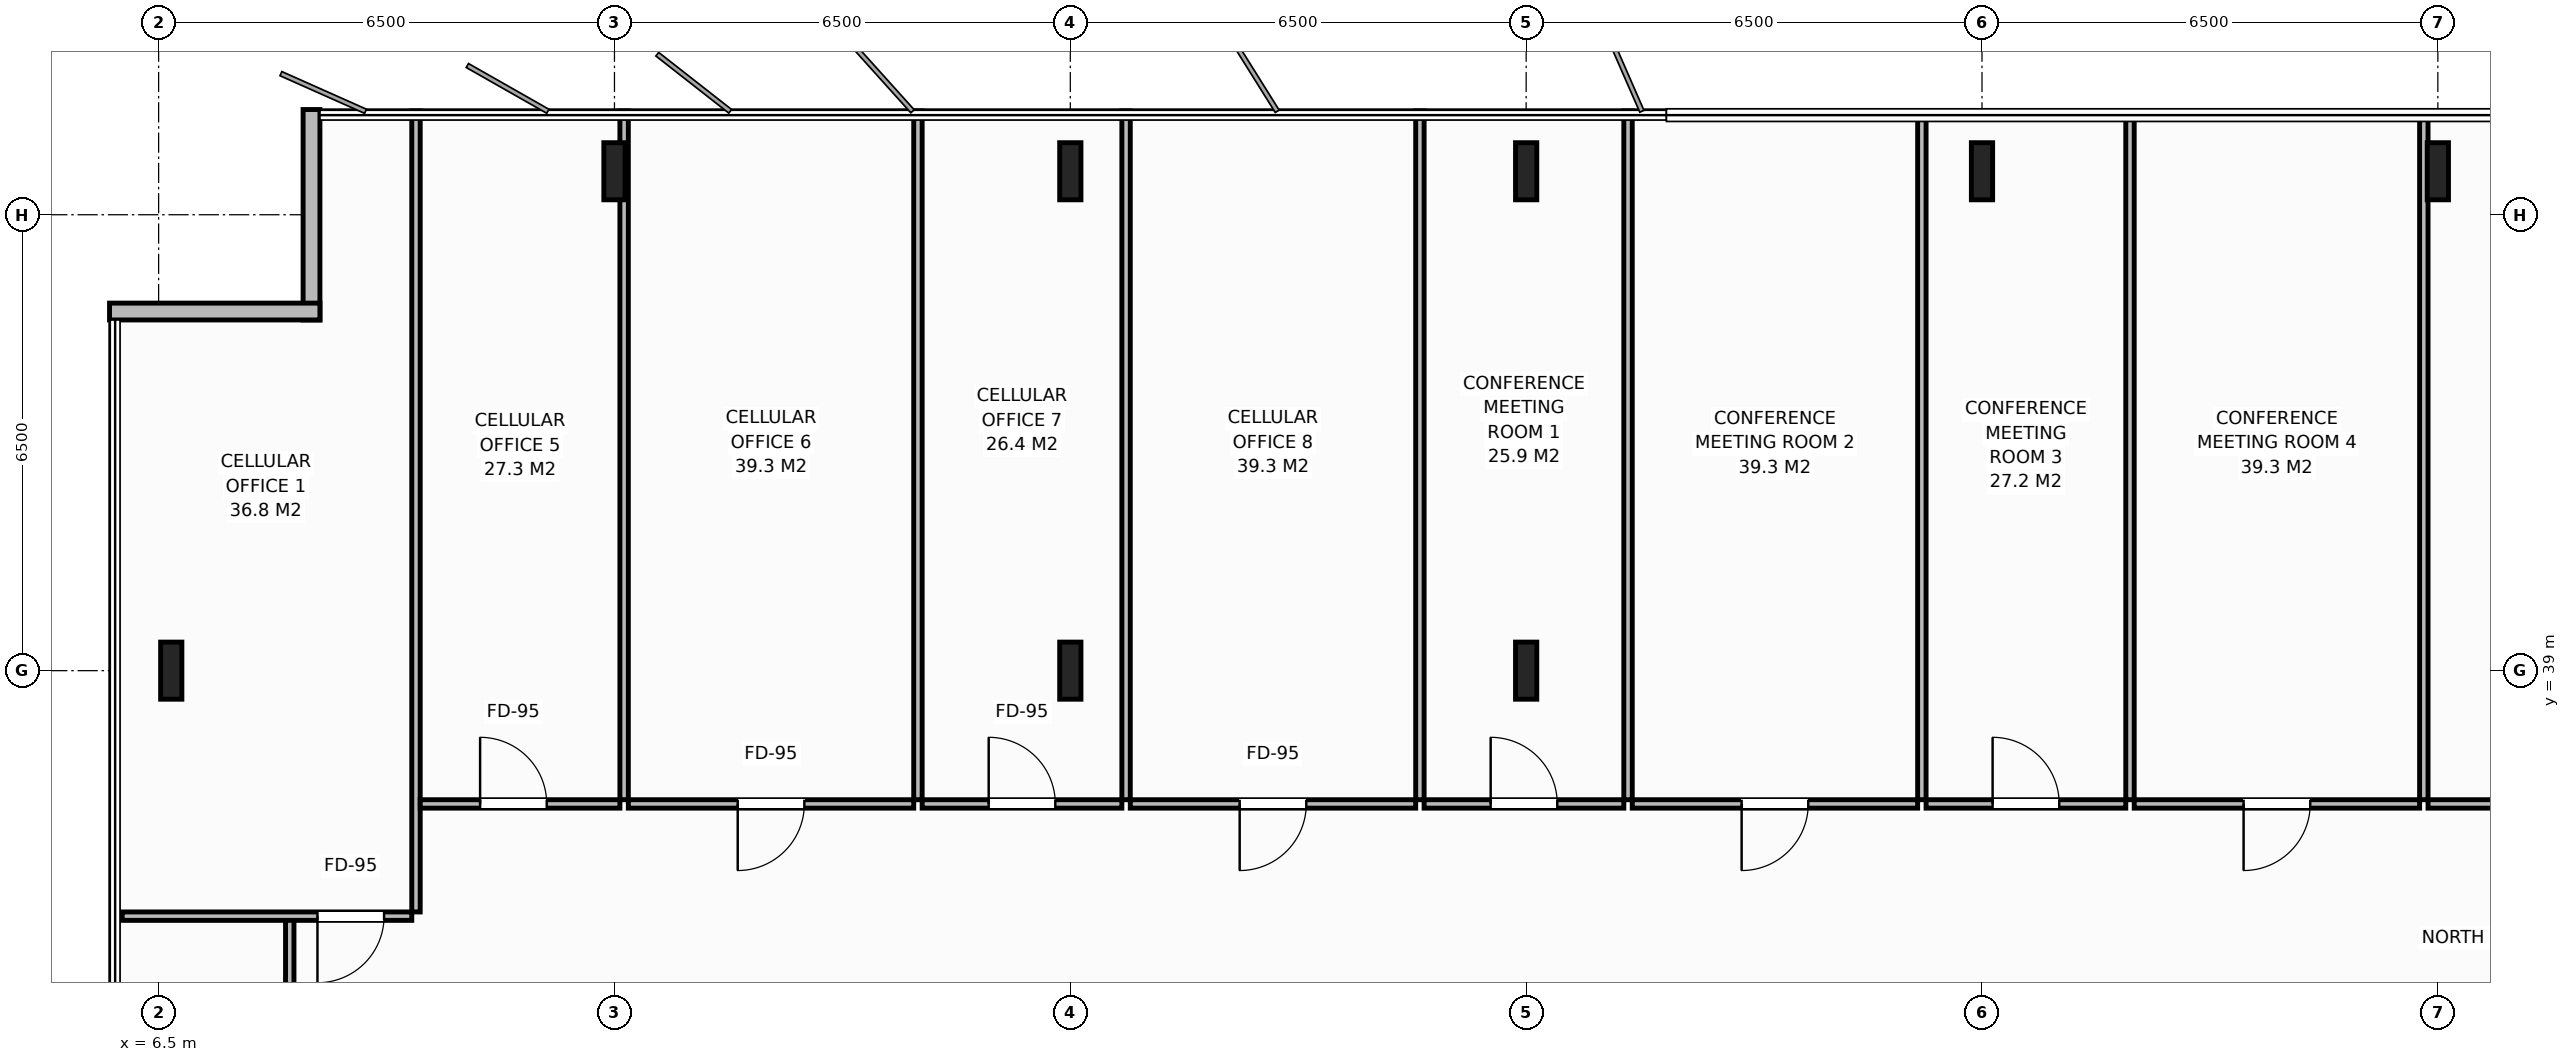
"""IFC4 building model, lengths in metres.
Left out: names, types, materials, properties, quantities, classifications, styles, units other than length and angle.
Written with IfcOpenShell. Run it as: python <this file> out.ifc"""

import sys

from ifc_helpers import new_model, si_unit, direction, frame, frame_2d, origin, origin_2d, place, context, subcontext, project, spatial, rectangle, i_section, extrude, element, fill, save


model = new_model("IFC4")
c1 = context("Model", 3, precision=1e-05, world=origin(), true_north=direction((0.0, 1.0)))
c2 = subcontext(c1, "Body", "Model", "MODEL_VIEW")
j1 = project(units=[si_unit("LENGTHUNIT", "METRE"), si_unit("PLANEANGLEUNIT", "RADIAN")], contexts=[c1])
p1 = place(None, origin())
s1 = spatial("IfcSite", under=j1, at=p1, CompositionType="ELEMENT")
p2 = place(p1, origin())
s2 = spatial("IfcBuilding", under=s1, at=p2, CompositionType="ELEMENT")
p3 = place(p2, frame((0.0, 0.0, 248.0)))
s3 = spatial("IfcBuildingStorey", under=s2, at=p3, CompositionType="ELEMENT", Elevation=248.0)
for number, where, z_axis, x_axis in (
    (1, (19.5, 39.0, 0.0), (0.0, 0.0, 1.0), (1.0, 0.0, 0.0)),
    (2, (26.0, 39.0, 0.0), (0.0, 0.0, 1.0), (1.0, 0.0, 0.0)),
    (3, (13.0, 46.12, 0.0), (0.0, 0.0, 1.0), (1.0, 0.0, 0.0)),
    (4, (19.5, 46.12, 0.0), (0.0, 0.0, 1.0), (1.0, 0.0, 0.0)),
    (5, (26.0, 46.12, 0.0), (0.0, 0.0, 1.0), (1.0, 0.0, 0.0)),
    (6, (32.5, 46.12, 0.0), (0.0, 0.0, 1.0), (1.0, 0.0, 0.0)),
    (7, (39.0, 46.12, 0.0), (0.0, 0.0, 1.0), (1.0, 0.0, 0.0)),
    (8, (6.68, 39.0, 0.0), (0.0, 0.0, 1.0), (1.0, 0.0, 0.0)),
):
    element("IfcColumn", number, at=place(p3, frame(where, z_axis=z_axis, x_axis=x_axis)), inside=s3, PredefinedType="COLUMN", context=c2, shape_type="SweptSolid", body=[
        extrude(i_section(OverallWidth=0.303, OverallDepth=0.814, WebThickness=0.021, FlangeThickness=0.04, at=origin_2d()), origin(), (0.0, 0.0, 1.0), 3.8),
    ])
for number, where, z_axis, x_axis in (
    (9, (8.68, 44.0, 0.0), (0.0, 0.0, 1.0), (0.0, 1.0, 0.0)),
    (10, (5.8, 44.12, 0.0), (0.0, 0.0, 1.0), (1.0, 0.0, 0.0)),
):
    element("IfcWall", number, at=place(p3, frame(where, z_axis=z_axis, x_axis=x_axis)), inside=s3, PredefinedType="STANDARD", context=c2, shape_type="SweptSolid", body=[
        extrude(rectangle(XDim=3.0, YDim=0.24, at=frame_2d((1.5, 0.0))), origin(), (0.0, 0.0, 1.0), 3.58),
    ])
p4 = place(p3, frame((8.37, 33.4, 0.0), z_axis=(0.0, 0.0, 1.0), x_axis=(0.0, 1.0, 0.0)))
e11 = element("IfcWall", 11, at=p4, inside=s3, PredefinedType="PARTITIONING", context=c2, shape_type="SweptSolid", body=[
    extrude(rectangle(XDim=2.1, YDim=0.12, at=frame_2d((1.05, 0.0))), origin(), (0.0, 0.0, 1.0), 3.58),
])
p5 = place(p3, frame((10.17, 35.56, 0.0), z_axis=(0.0, 0.0, 1.0), x_axis=(0.0, 1.0, 0.0)))
e12 = element("IfcWall", 12, at=p5, inside=s3, PredefinedType="PARTITIONING", context=c2, shape_type="SweptSolid", body=[
    extrude(rectangle(XDim=11.42, YDim=0.12, at=frame_2d((5.71, 0.0))), origin(), (0.0, 0.0, 1.0), 3.58),
])
p6 = place(p3, frame((5.98, 35.5, 0.0), z_axis=(0.0, 0.0, 1.0), x_axis=(1.0, 0.0, 0.0)))
e13 = element("IfcWall", 13, at=p6, inside=s3, PredefinedType="PARTITIONING", context=c2, shape_type="SweptSolid", body=[
    extrude(rectangle(XDim=4.13, YDim=0.12, at=frame_2d((2.065, 0.0))), origin(), (0.0, 0.0, 1.0), 3.58),
])
p7 = place(p6, frame((2.785, 0.0, 0.0)))
e14 = element("IfcOpeningElement", 14, at=p7, cuts=e13, PredefinedType="OPENING", context=c2, shape_type="SweptSolid", body=[
    extrude(rectangle(XDim=0.95, YDim=2.15, at=frame_2d((0.475, 1.075))), frame((0.0, 0.07, 0.0), z_axis=(0.0, -1.0, 0.0), x_axis=(1.0, 0.0, 0.0)), (0.0, 0.0, 1.0), 0.14),
])
p8 = place(p3, frame((13.138, 37.16, 0.0), z_axis=(0.0, 0.0, 1.0), x_axis=(0.0, 1.0, 0.0)))
e15 = element("IfcWall", 15, at=p8, inside=s3, PredefinedType="PARTITIONING", context=c2, shape_type="SweptSolid", body=[
    extrude(rectangle(XDim=9.82, YDim=0.12, at=frame_2d((4.91, 0.0))), origin(), (0.0, 0.0, 1.0), 2.88),
])
p9 = place(p3, frame((10.23, 37.1, 0.0), z_axis=(0.0, 0.0, 1.0), x_axis=(1.0, 0.0, 0.0)))
e16 = element("IfcWall", 16, at=p9, inside=s3, PredefinedType="PARTITIONING", context=c2, shape_type="SweptSolid", body=[
    extrude(rectangle(XDim=2.848, YDim=0.12, at=frame_2d((1.424, 0.0))), origin(), (0.0, 0.0, 1.0), 3.58),
])
p10 = place(p9, frame((0.854, 0.0, 0.0)))
e17 = element("IfcOpeningElement", 17, at=p10, cuts=e16, PredefinedType="OPENING", context=c2, shape_type="SweptSolid", body=[
    extrude(rectangle(XDim=0.95, YDim=2.15, at=frame_2d((0.475, 1.075))), frame((0.0, 0.07, 0.0), z_axis=(0.0, -1.0, 0.0), x_axis=(1.0, 0.0, 0.0)), (0.0, 0.0, 1.0), 0.14),
])
p11 = place(p3, frame((17.327, 37.16, 0.0), z_axis=(0.0, 0.0, 1.0), x_axis=(0.0, 1.0, 0.0)))
e18 = element("IfcWall", 18, at=p11, inside=s3, PredefinedType="PARTITIONING", context=c2, shape_type="SweptSolid", body=[
    extrude(rectangle(XDim=9.82, YDim=0.12, at=frame_2d((4.91, 0.0))), origin(), (0.0, 0.0, 1.0), 3.58),
])
p12 = place(p3, frame((13.198, 37.1, 0.0), z_axis=(0.0, 0.0, 1.0), x_axis=(1.0, 0.0, 0.0)))
e19 = element("IfcWall", 19, at=p12, inside=s3, PredefinedType="PARTITIONING", context=c2, shape_type="SweptSolid", body=[
    extrude(rectangle(XDim=4.07, YDim=0.12, at=frame_2d((2.035, 0.0))), origin(), (0.0, 0.0, 1.0), 3.58),
])
p13 = place(p12, frame((1.56, 0.0, 0.0)))
e20 = element("IfcOpeningElement", 20, at=p13, cuts=e19, PredefinedType="OPENING", context=c2, shape_type="SweptSolid", body=[
    extrude(rectangle(XDim=0.95, YDim=2.15, at=frame_2d((0.475, 1.075))), frame((0.0, 0.07, 0.0), z_axis=(0.0, -1.0, 0.0), x_axis=(1.0, 0.0, 0.0)), (0.0, 0.0, 1.0), 0.14),
])
p14 = place(p3, frame((20.295, 37.16, 0.0), z_axis=(0.0, 0.0, 1.0), x_axis=(0.0, 1.0, 0.0)))
e21 = element("IfcWall", 21, at=p14, inside=s3, PredefinedType="PARTITIONING", context=c2, shape_type="SweptSolid", body=[
    extrude(rectangle(XDim=9.82, YDim=0.12, at=frame_2d((4.91, 0.0))), origin(), (0.0, 0.0, 1.0), 3.58),
])
p15 = place(p3, frame((17.387, 37.1, 0.0), z_axis=(0.0, 0.0, 1.0), x_axis=(1.0, 0.0, 0.0)))
e22 = element("IfcWall", 22, at=p15, inside=s3, PredefinedType="PARTITIONING", context=c2, shape_type="SweptSolid", body=[
    extrude(rectangle(XDim=2.848, YDim=0.12, at=frame_2d((1.424, 0.0))), origin(), (0.0, 0.0, 1.0), 3.58),
])
p16 = place(p15, frame((0.949, 0.0, 0.0)))
e23 = element("IfcOpeningElement", 23, at=p16, cuts=e22, PredefinedType="OPENING", context=c2, shape_type="SweptSolid", body=[
    extrude(rectangle(XDim=0.95, YDim=2.15, at=frame_2d((0.475, 1.075))), frame((0.0, 0.07, 0.0), z_axis=(0.0, -1.0, 0.0), x_axis=(1.0, 0.0, 0.0)), (0.0, 0.0, 1.0), 0.14),
])
p17 = place(p3, frame((24.485, 37.16, 0.0), z_axis=(0.0, 0.0, 1.0), x_axis=(0.0, 1.0, 0.0)))
e24 = element("IfcWall", 24, at=p17, inside=s3, PredefinedType="PARTITIONING", context=c2, shape_type="SweptSolid", body=[
    extrude(rectangle(XDim=9.82, YDim=0.12, at=frame_2d((4.91, 0.0))), origin(), (0.0, 0.0, 1.0), 3.58),
])
p18 = place(p3, frame((20.355, 37.1, 0.0), z_axis=(0.0, 0.0, 1.0), x_axis=(1.0, 0.0, 0.0)))
e25 = element("IfcWall", 25, at=p18, inside=s3, PredefinedType="PARTITIONING", context=c2, shape_type="SweptSolid", body=[
    extrude(rectangle(XDim=4.07, YDim=0.12, at=frame_2d((2.035, 0.0))), origin(), (0.0, 0.0, 1.0), 3.58),
])
p19 = place(p18, frame((1.56, 0.0, 0.0)))
e26 = element("IfcOpeningElement", 26, at=p19, cuts=e25, PredefinedType="OPENING", context=c2, shape_type="SweptSolid", body=[
    extrude(rectangle(XDim=0.95, YDim=2.15, at=frame_2d((0.475, 1.075))), frame((0.0, 0.07, 0.0), z_axis=(0.0, -1.0, 0.0), x_axis=(1.0, 0.0, 0.0)), (0.0, 0.0, 1.0), 0.14),
])
p20 = place(p3, frame((27.453, 37.16, 0.0), z_axis=(0.0, 0.0, 1.0), x_axis=(0.0, 1.0, 0.0)))
e27 = element("IfcWall", 27, at=p20, inside=s3, PredefinedType="PARTITIONING", context=c2, shape_type="SweptSolid", body=[
    extrude(rectangle(XDim=9.82, YDim=0.12, at=frame_2d((4.91, 0.0))), origin(), (0.0, 0.0, 1.0), 3.58),
])
p21 = place(p3, frame((24.545, 37.1, 0.0), z_axis=(0.0, 0.0, 1.0), x_axis=(1.0, 0.0, 0.0)))
e28 = element("IfcWall", 28, at=p21, inside=s3, PredefinedType="PARTITIONING", context=c2, shape_type="SweptSolid", body=[
    extrude(rectangle(XDim=2.848, YDim=0.12, at=frame_2d((1.424, 0.0))), origin(), (0.0, 0.0, 1.0), 3.58),
])
p22 = place(p21, frame((0.949, 0.0, 0.0)))
e29 = element("IfcOpeningElement", 29, at=p22, cuts=e28, PredefinedType="OPENING", context=c2, shape_type="SweptSolid", body=[
    extrude(rectangle(XDim=0.95, YDim=2.15, at=frame_2d((0.475, 1.075))), frame((0.0, 0.07, 0.0), z_axis=(0.0, -1.0, 0.0), x_axis=(1.0, 0.0, 0.0)), (0.0, 0.0, 1.0), 0.14),
])
p23 = place(p3, frame((31.642, 37.16, 0.0), z_axis=(0.0, 0.0, 1.0), x_axis=(0.0, 1.0, 0.0)))
e30 = element("IfcWall", 30, at=p23, inside=s3, PredefinedType="PARTITIONING", context=c2, shape_type="SweptSolid", body=[
    extrude(rectangle(XDim=9.82, YDim=0.12, at=frame_2d((4.91, 0.0))), origin(), (0.0, 0.0, 1.0), 3.58),
])
p24 = place(p3, frame((27.513, 37.1, 0.0), z_axis=(0.0, 0.0, 1.0), x_axis=(1.0, 0.0, 0.0)))
e31 = element("IfcWall", 31, at=p24, inside=s3, PredefinedType="PARTITIONING", context=c2, shape_type="SweptSolid", body=[
    extrude(rectangle(XDim=4.07, YDim=0.12, at=frame_2d((2.035, 0.0))), origin(), (0.0, 0.0, 1.0), 3.58),
])
p25 = place(p24, frame((1.56, 0.0, 0.0)))
e32 = element("IfcOpeningElement", 32, at=p25, cuts=e31, PredefinedType="OPENING", context=c2, shape_type="SweptSolid", body=[
    extrude(rectangle(XDim=0.95, YDim=2.15, at=frame_2d((0.475, 1.075))), frame((0.0, 0.07, 0.0), z_axis=(0.0, -1.0, 0.0), x_axis=(1.0, 0.0, 0.0)), (0.0, 0.0, 1.0), 0.14),
])
p26 = place(p3, frame((34.61, 37.16, 0.0), z_axis=(0.0, 0.0, 1.0), x_axis=(0.0, 1.0, 0.0)))
e33 = element("IfcWall", 33, at=p26, inside=s3, PredefinedType="PARTITIONING", context=c2, shape_type="SweptSolid", body=[
    extrude(rectangle(XDim=9.82, YDim=0.12, at=frame_2d((4.91, 0.0))), origin(), (0.0, 0.0, 1.0), 3.58),
])
p27 = place(p3, frame((31.702, 37.1, 0.0), z_axis=(0.0, 0.0, 1.0), x_axis=(1.0, 0.0, 0.0)))
e34 = element("IfcWall", 34, at=p27, inside=s3, PredefinedType="PARTITIONING", context=c2, shape_type="SweptSolid", body=[
    extrude(rectangle(XDim=2.848, YDim=0.12, at=frame_2d((1.424, 0.0))), origin(), (0.0, 0.0, 1.0), 3.58),
])
p28 = place(p27, frame((0.949, 0.0, 0.0)))
e35 = element("IfcOpeningElement", 35, at=p28, cuts=e34, PredefinedType="OPENING", context=c2, shape_type="SweptSolid", body=[
    extrude(rectangle(XDim=0.95, YDim=2.15, at=frame_2d((0.475, 1.075))), frame((0.0, 0.07, 0.0), z_axis=(0.0, -1.0, 0.0), x_axis=(1.0, 0.0, 0.0)), (0.0, 0.0, 1.0), 0.14),
])
p29 = place(p3, frame((38.8, 37.16, 0.0), z_axis=(0.0, 0.0, 1.0), x_axis=(0.0, 1.0, 0.0)))
e36 = element("IfcWall", 36, at=p29, inside=s3, PredefinedType="PARTITIONING", context=c2, shape_type="SweptSolid", body=[
    extrude(rectangle(XDim=9.82, YDim=0.12, at=frame_2d((4.91, 0.0))), origin(), (0.0, 0.0, 1.0), 2.88),
])
p30 = place(p3, frame((34.67, 37.1, 0.0), z_axis=(0.0, 0.0, 1.0), x_axis=(1.0, 0.0, 0.0)))
e37 = element("IfcWall", 37, at=p30, inside=s3, PredefinedType="PARTITIONING", context=c2, shape_type="SweptSolid", body=[
    extrude(rectangle(XDim=4.07, YDim=0.12, at=frame_2d((2.035, 0.0))), origin(), (0.0, 0.0, 1.0), 3.58),
])
p31 = place(p30, frame((1.56, 0.0, 0.0)))
e38 = element("IfcOpeningElement", 38, at=p31, cuts=e37, PredefinedType="OPENING", context=c2, shape_type="SweptSolid", body=[
    extrude(rectangle(XDim=0.95, YDim=2.15, at=frame_2d((0.475, 1.075))), frame((0.0, 0.07, 0.0), z_axis=(0.0, -1.0, 0.0), x_axis=(1.0, 0.0, 0.0)), (0.0, 0.0, 1.0), 0.14),
])
p32 = place(p3, frame((38.86, 37.1, 0.0), z_axis=(0.0, 0.0, 1.0), x_axis=(1.0, 0.0, 0.0)))
e39 = element("IfcWall", 39, at=p32, inside=s3, PredefinedType="PARTITIONING", context=c2, shape_type="SweptSolid", body=[
    extrude(rectangle(XDim=12.72, YDim=0.12, at=frame_2d((6.36, 0.0))), origin(), (0.0, 0.0, 1.0), 3.58),
])
p33 = place(p32, frame((3.816, 0.0, 0.0)))
e40 = element("IfcOpeningElement", 40, at=p33, cuts=e39, PredefinedType="OPENING", context=c2, shape_type="SweptSolid", body=[
    extrude(rectangle(XDim=0.95, YDim=2.15, at=frame_2d((0.475, 1.075))), frame((0.0, 0.07, 0.0), z_axis=(0.0, -1.0, 0.0), x_axis=(1.0, 0.0, 0.0)), (0.0, 0.0, 1.0), 0.14),
])
p34 = place(p7, origin())
e41 = element("IfcDoor", 41, at=p34, inside=s3, OperationType="SINGLE_SWING_RIGHT", PredefinedType="DOOR", context=c2, shape_type="SweptSolid", body=[
    extrude(rectangle(XDim=0.95, YDim=2.15, at=frame_2d((0.475, 1.075))), frame((0.0, 0.025, 0.0), z_axis=(0.0, -1.0, 0.0), x_axis=(1.0, 0.0, 0.0)), (0.0, 0.0, 1.0), 0.05),
])
fill(e14, e41)
p35 = place(p10, origin())
e42 = element("IfcDoor", 42, at=p35, inside=s3, OperationType="SINGLE_SWING_LEFT", PredefinedType="DOOR", context=c2, shape_type="SweptSolid", body=[
    extrude(rectangle(XDim=0.95, YDim=2.15, at=frame_2d((0.475, 1.075))), frame((0.0, 0.025, 0.0), z_axis=(0.0, -1.0, 0.0), x_axis=(1.0, 0.0, 0.0)), (0.0, 0.0, 1.0), 0.05),
])
fill(e17, e42)
p36 = place(p13, origin())
e43 = element("IfcDoor", 43, at=p36, inside=s3, OperationType="SINGLE_SWING_RIGHT", PredefinedType="DOOR", context=c2, shape_type="SweptSolid", body=[
    extrude(rectangle(XDim=0.95, YDim=2.15, at=frame_2d((0.475, 1.075))), frame((0.0, 0.025, 0.0), z_axis=(0.0, -1.0, 0.0), x_axis=(1.0, 0.0, 0.0)), (0.0, 0.0, 1.0), 0.05),
])
fill(e20, e43)
p37 = place(p16, origin())
e44 = element("IfcDoor", 44, at=p37, inside=s3, OperationType="SINGLE_SWING_LEFT", PredefinedType="DOOR", context=c2, shape_type="SweptSolid", body=[
    extrude(rectangle(XDim=0.95, YDim=2.15, at=frame_2d((0.475, 1.075))), frame((0.0, 0.025, 0.0), z_axis=(0.0, -1.0, 0.0), x_axis=(1.0, 0.0, 0.0)), (0.0, 0.0, 1.0), 0.05),
])
fill(e23, e44)
p38 = place(p19, origin())
e45 = element("IfcDoor", 45, at=p38, inside=s3, OperationType="SINGLE_SWING_RIGHT", PredefinedType="DOOR", context=c2, shape_type="SweptSolid", body=[
    extrude(rectangle(XDim=0.95, YDim=2.15, at=frame_2d((0.475, 1.075))), frame((0.0, 0.025, 0.0), z_axis=(0.0, -1.0, 0.0), x_axis=(1.0, 0.0, 0.0)), (0.0, 0.0, 1.0), 0.05),
])
fill(e26, e45)
p39 = place(p22, origin())
e46 = element("IfcDoor", 46, at=p39, inside=s3, OperationType="SINGLE_SWING_LEFT", PredefinedType="DOOR", context=c2, shape_type="SweptSolid", body=[
    extrude(rectangle(XDim=0.95, YDim=2.15, at=frame_2d((0.475, 1.075))), frame((0.0, 0.025, 0.0), z_axis=(0.0, -1.0, 0.0), x_axis=(1.0, 0.0, 0.0)), (0.0, 0.0, 1.0), 0.05),
])
fill(e29, e46)
p40 = place(p25, origin())
e47 = element("IfcDoor", 47, at=p40, inside=s3, OperationType="SINGLE_SWING_RIGHT", PredefinedType="DOOR", context=c2, shape_type="SweptSolid", body=[
    extrude(rectangle(XDim=0.95, YDim=2.15, at=frame_2d((0.475, 1.075))), frame((0.0, 0.025, 0.0), z_axis=(0.0, -1.0, 0.0), x_axis=(1.0, 0.0, 0.0)), (0.0, 0.0, 1.0), 0.05),
])
fill(e32, e47)
p41 = place(p28, origin())
e48 = element("IfcDoor", 48, at=p41, inside=s3, OperationType="SINGLE_SWING_LEFT", PredefinedType="DOOR", context=c2, shape_type="SweptSolid", body=[
    extrude(rectangle(XDim=0.95, YDim=2.15, at=frame_2d((0.475, 1.075))), frame((0.0, 0.025, 0.0), z_axis=(0.0, -1.0, 0.0), x_axis=(1.0, 0.0, 0.0)), (0.0, 0.0, 1.0), 0.05),
])
fill(e35, e48)
p42 = place(p31, origin())
e49 = element("IfcDoor", 49, at=p42, inside=s3, OperationType="SINGLE_SWING_RIGHT", PredefinedType="DOOR", context=c2, shape_type="SweptSolid", body=[
    extrude(rectangle(XDim=0.95, YDim=2.15, at=frame_2d((0.475, 1.075))), frame((0.0, 0.025, 0.0), z_axis=(0.0, -1.0, 0.0), x_axis=(1.0, 0.0, 0.0)), (0.0, 0.0, 1.0), 0.05),
])
fill(e38, e49)
save(model, sys.argv[1])
